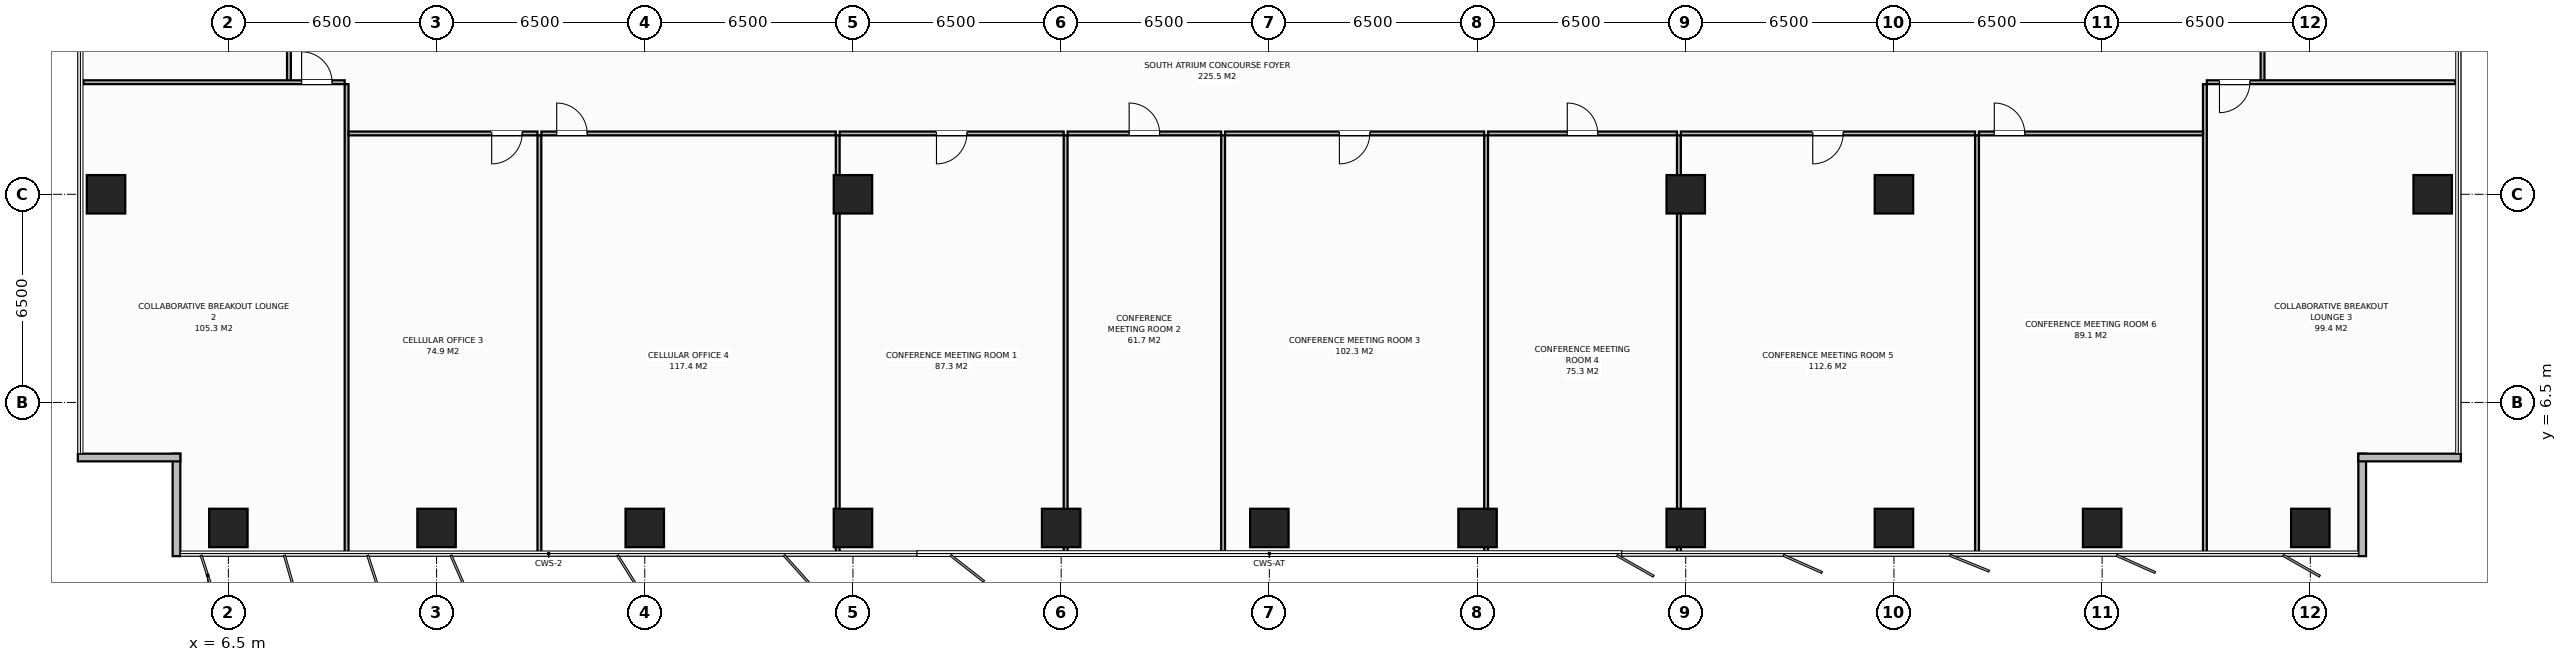
"""IFC4 building model, lengths in metres.
Left out: names, types, materials, properties, quantities, classifications, styles, units other than length and angle.
Written with IfcOpenShell. Run it as: python <this file> out.ifc"""

import sys

from ifc_helpers import new_model, si_unit, direction, frame, frame_2d, origin, origin_2d, place, context, subcontext, project, spatial, rectangle, extrude, element, fill, save


model = new_model("IFC4")
c1 = context("Model", 3, precision=1e-05, world=origin(), true_north=direction((0.0, 1.0)))
c2 = subcontext(c1, "Body", "Model", "MODEL_VIEW")
j1 = project(units=[si_unit("LENGTHUNIT", "METRE"), si_unit("PLANEANGLEUNIT", "RADIAN")], contexts=[c1])
p1 = place(None, origin())
s1 = spatial("IfcSite", under=j1, at=p1, CompositionType="ELEMENT")
p2 = place(p1, origin())
s2 = spatial("IfcBuilding", under=s1, at=p2, CompositionType="ELEMENT")
p3 = place(p2, frame((0.0, 0.0, 135.4)))
s3 = spatial("IfcBuildingStorey", under=s2, at=p3, CompositionType="ELEMENT", Elevation=135.4)
for number, where, z_axis, x_axis in (
    (1, (58.5, 13.0, 0.0), (0.0, 0.0, 1.0), (1.0, 0.0, 0.0)),
    (2, (26.0, 13.0, 0.0), (0.0, 0.0, 1.0), (1.0, 0.0, 0.0)),
    (3, (52.0, 13.0, 0.0), (0.0, 0.0, 1.0), (1.0, 0.0, 0.0)),
    (4, (6.5, 2.58, 0.0), (0.0, 0.0, 1.0), (1.0, 0.0, 0.0)),
    (5, (13.0, 2.58, 0.0), (0.0, 0.0, 1.0), (1.0, 0.0, 0.0)),
    (6, (19.5, 2.58, 0.0), (0.0, 0.0, 1.0), (1.0, 0.0, 0.0)),
    (7, (26.0, 2.58, 0.0), (0.0, 0.0, 1.0), (1.0, 0.0, 0.0)),
    (8, (32.5, 2.58, 0.0), (0.0, 0.0, 1.0), (1.0, 0.0, 0.0)),
    (9, (39.0, 2.58, 0.0), (0.0, 0.0, 1.0), (1.0, 0.0, 0.0)),
    (10, (45.5, 2.58, 0.0), (0.0, 0.0, 1.0), (1.0, 0.0, 0.0)),
    (11, (52.0, 2.58, 0.0), (0.0, 0.0, 1.0), (1.0, 0.0, 0.0)),
    (12, (58.5, 2.58, 0.0), (0.0, 0.0, 1.0), (1.0, 0.0, 0.0)),
    (13, (65.0, 2.58, 0.0), (0.0, 0.0, 1.0), (1.0, 0.0, 0.0)),
    (14, (71.5, 2.58, 0.0), (0.0, 0.0, 1.0), (1.0, 0.0, 0.0)),
    (15, (2.68, 13.0, 0.0), (0.0, 0.0, 1.0), (1.0, 0.0, 0.0)),
    (16, (75.32, 13.0, 0.0), (0.0, 0.0, 1.0), (1.0, 0.0, 0.0)),
):
    element("IfcColumn", number, at=place(p3, frame(where, z_axis=z_axis, x_axis=x_axis)), inside=s3, PredefinedType="COLUMN", context=c2, shape_type="SweptSolid", body=[
        extrude(rectangle(XDim=1.2, YDim=1.2, at=origin_2d()), origin(), (0.0, 0.0, 1.0), 3.8),
    ])
for number, where, z_axis, x_axis in (
    (17, (4.88, 1.7, 0.0), (0.0, 0.0, 1.0), (0.0, 1.0, 0.0)),
    (18, (5.0, 4.78, 0.0), (0.0, 0.0, 1.0), (-1.0, 0.0, 0.0)),
    (19, (73.12, 4.9, 0.0), (0.0, 0.0, 1.0), (0.0, -1.0, 0.0)),
    (20, (76.2, 4.78, 0.0), (0.0, 0.0, 1.0), (-1.0, 0.0, 0.0)),
):
    element("IfcWall", number, at=place(p3, frame(where, z_axis=z_axis, x_axis=x_axis)), inside=s3, PredefinedType="STANDARD", context=c2, shape_type="SweptSolid", body=[
        extrude(rectangle(XDim=3.2, YDim=0.24, at=frame_2d((1.6, 0.0))), origin(), (0.0, 0.0, 1.0), 3.52),
    ])
for number, where, z_axis, x_axis in (
    (21, (8.391, 16.5, 0.0), (0.0, 0.0, 1.0), (0.0, 1.0, 0.0)),
    (22, (70.009, 16.5, 0.0), (0.0, 0.0, 1.0), (0.0, 1.0, 0.0)),
):
    element("IfcWall", number, at=place(p3, frame(where, z_axis=z_axis, x_axis=x_axis)), inside=s3, PredefinedType="PARTITIONING", context=c2, shape_type="SweptSolid", body=[
        extrude(rectangle(XDim=2.1, YDim=0.12, at=frame_2d((1.05, 0.0))), origin(), (0.0, 0.0, 1.0), 3.52),
    ])
p4 = place(p3, frame((10.191, 1.72, 0.0), z_axis=(0.0, 0.0, 1.0), x_axis=(0.0, 1.0, 0.0)))
e23 = element("IfcWall", 23, at=p4, inside=s3, PredefinedType="PARTITIONING", context=c2, shape_type="SweptSolid", body=[
    extrude(rectangle(XDim=14.72, YDim=0.12, at=frame_2d((7.36, 0.0))), origin(), (0.0, 0.0, 1.0), 3.52),
])
p5 = place(p3, frame((1.98, 16.5, 0.0), z_axis=(0.0, 0.0, 1.0), x_axis=(1.0, 0.0, 0.0)))
e24 = element("IfcWall", 24, at=p5, inside=s3, PredefinedType="PARTITIONING", context=c2, shape_type="SweptSolid", body=[
    extrude(rectangle(XDim=8.151, YDim=0.12, at=frame_2d((4.076, 0.0))), origin(), (0.0, 0.0, 1.0), 3.52),
])
p6 = place(p5, frame((6.806, 0.0, 0.0)))
e25 = element("IfcOpeningElement", 25, at=p6, cuts=e24, PredefinedType="OPENING", context=c2, shape_type="SweptSolid", body=[
    extrude(rectangle(XDim=0.95, YDim=2.15, at=frame_2d((0.475, 1.075))), frame((0.0, 0.07, 0.0), z_axis=(0.0, -1.0, 0.0), x_axis=(1.0, 0.0, 0.0)), (0.0, 0.0, 1.0), 0.14),
])
p7 = place(p3, frame((16.21, 1.72, 0.0), z_axis=(0.0, 0.0, 1.0), x_axis=(0.0, 1.0, 0.0)))
e26 = element("IfcWall", 26, at=p7, inside=s3, PredefinedType="PARTITIONING", context=c2, shape_type="SweptSolid", body=[
    extrude(rectangle(XDim=13.12, YDim=0.12, at=frame_2d((6.56, 0.0))), origin(), (0.0, 0.0, 1.0), 3.52),
])
p8 = place(p3, frame((10.251, 14.9, 0.0), z_axis=(0.0, 0.0, 1.0), x_axis=(1.0, 0.0, 0.0)))
e27 = element("IfcWall", 27, at=p8, inside=s3, PredefinedType="PARTITIONING", context=c2, shape_type="SweptSolid", body=[
    extrude(rectangle(XDim=5.899, YDim=0.12, at=frame_2d((2.95, 0.0))), origin(), (0.0, 0.0, 1.0), 3.52),
])
p9 = place(p8, frame((4.469, 0.0, 0.0)))
e28 = element("IfcOpeningElement", 28, at=p9, cuts=e27, PredefinedType="OPENING", context=c2, shape_type="SweptSolid", body=[
    extrude(rectangle(XDim=0.95, YDim=2.15, at=frame_2d((0.475, 1.075))), frame((0.0, 0.07, 0.0), z_axis=(0.0, -1.0, 0.0), x_axis=(1.0, 0.0, 0.0)), (0.0, 0.0, 1.0), 0.14),
])
p10 = place(p3, frame((25.525, 1.72, 0.0), z_axis=(0.0, 0.0, 1.0), x_axis=(0.0, 1.0, 0.0)))
e29 = element("IfcWall", 29, at=p10, inside=s3, PredefinedType="PARTITIONING", context=c2, shape_type="SweptSolid", body=[
    extrude(rectangle(XDim=13.12, YDim=0.12, at=frame_2d((6.56, 0.0))), origin(), (0.0, 0.0, 1.0), 3.52),
])
p11 = place(p3, frame((16.271, 14.9, 0.0), z_axis=(0.0, 0.0, 1.0), x_axis=(1.0, 0.0, 0.0)))
e30 = element("IfcWall", 30, at=p11, inside=s3, PredefinedType="PARTITIONING", context=c2, shape_type="SweptSolid", body=[
    extrude(rectangle(XDim=9.194, YDim=0.12, at=frame_2d((4.597, 0.0))), origin(), (0.0, 0.0, 1.0), 3.52),
])
p12 = place(p11, frame((0.48, 0.0, 0.0)))
e31 = element("IfcOpeningElement", 31, at=p12, cuts=e30, PredefinedType="OPENING", context=c2, shape_type="SweptSolid", body=[
    extrude(rectangle(XDim=0.95, YDim=2.15, at=frame_2d((0.475, 1.075))), frame((0.0, 0.07, 0.0), z_axis=(0.0, -1.0, 0.0), x_axis=(1.0, 0.0, 0.0)), (0.0, 0.0, 1.0), 0.14),
])
p13 = place(p3, frame((32.64, 1.72, 0.0), z_axis=(0.0, 0.0, 1.0), x_axis=(0.0, 1.0, 0.0)))
e32 = element("IfcWall", 32, at=p13, inside=s3, PredefinedType="PARTITIONING", context=c2, shape_type="SweptSolid", body=[
    extrude(rectangle(XDim=13.12, YDim=0.12, at=frame_2d((6.56, 0.0))), origin(), (0.0, 0.0, 1.0), 2.72),
])
p14 = place(p3, frame((25.585, 14.9, 0.0), z_axis=(0.0, 0.0, 1.0), x_axis=(1.0, 0.0, 0.0)))
e33 = element("IfcWall", 33, at=p14, inside=s3, PredefinedType="PARTITIONING", context=c2, shape_type="SweptSolid", body=[
    extrude(rectangle(XDim=6.995, YDim=0.12, at=frame_2d((3.498, 0.0))), origin(), (0.0, 0.0, 1.0), 3.52),
])
p15 = place(p14, frame((3.023, 0.0, 0.0)))
e34 = element("IfcOpeningElement", 34, at=p15, cuts=e33, PredefinedType="OPENING", context=c2, shape_type="SweptSolid", body=[
    extrude(rectangle(XDim=0.95, YDim=2.15, at=frame_2d((0.475, 1.075))), frame((0.0, 0.07, 0.0), z_axis=(0.0, -1.0, 0.0), x_axis=(1.0, 0.0, 0.0)), (0.0, 0.0, 1.0), 0.14),
])
p16 = place(p3, frame((37.556, 1.72, 0.0), z_axis=(0.0, 0.0, 1.0), x_axis=(0.0, 1.0, 0.0)))
e35 = element("IfcWall", 35, at=p16, inside=s3, PredefinedType="PARTITIONING", context=c2, shape_type="SweptSolid", body=[
    extrude(rectangle(XDim=13.12, YDim=0.12, at=frame_2d((6.56, 0.0))), origin(), (0.0, 0.0, 1.0), 3.52),
])
p17 = place(p3, frame((32.7, 14.9, 0.0), z_axis=(0.0, 0.0, 1.0), x_axis=(1.0, 0.0, 0.0)))
e36 = element("IfcWall", 36, at=p17, inside=s3, PredefinedType="PARTITIONING", context=c2, shape_type="SweptSolid", body=[
    extrude(rectangle(XDim=4.796, YDim=0.12, at=frame_2d((2.398, 0.0))), origin(), (0.0, 0.0, 1.0), 3.52),
])
p18 = place(p17, frame((1.923, 0.0, 0.0)))
e37 = element("IfcOpeningElement", 37, at=p18, cuts=e36, PredefinedType="OPENING", context=c2, shape_type="SweptSolid", body=[
    extrude(rectangle(XDim=0.95, YDim=2.15, at=frame_2d((0.475, 1.075))), frame((0.0, 0.07, 0.0), z_axis=(0.0, -1.0, 0.0), x_axis=(1.0, 0.0, 0.0)), (0.0, 0.0, 1.0), 0.14),
])
p19 = place(p3, frame((45.767, 1.72, 0.0), z_axis=(0.0, 0.0, 1.0), x_axis=(0.0, 1.0, 0.0)))
e38 = element("IfcWall", 38, at=p19, inside=s3, PredefinedType="PARTITIONING", context=c2, shape_type="SweptSolid", body=[
    extrude(rectangle(XDim=13.12, YDim=0.12, at=frame_2d((6.56, 0.0))), origin(), (0.0, 0.0, 1.0), 3.52),
])
p20 = place(p3, frame((37.616, 14.9, 0.0), z_axis=(0.0, 0.0, 1.0), x_axis=(1.0, 0.0, 0.0)))
e39 = element("IfcWall", 39, at=p20, inside=s3, PredefinedType="PARTITIONING", context=c2, shape_type="SweptSolid", body=[
    extrude(rectangle(XDim=8.091, YDim=0.12, at=frame_2d((4.045, 0.0))), origin(), (0.0, 0.0, 1.0), 3.52),
])
p21 = place(p20, frame((3.571, 0.0, 0.0)))
e40 = element("IfcOpeningElement", 40, at=p21, cuts=e39, PredefinedType="OPENING", context=c2, shape_type="SweptSolid", body=[
    extrude(rectangle(XDim=0.95, YDim=2.15, at=frame_2d((0.475, 1.075))), frame((0.0, 0.07, 0.0), z_axis=(0.0, -1.0, 0.0), x_axis=(1.0, 0.0, 0.0)), (0.0, 0.0, 1.0), 0.14),
])
p22 = place(p3, frame((51.787, 1.72, 0.0), z_axis=(0.0, 0.0, 1.0), x_axis=(0.0, 1.0, 0.0)))
e41 = element("IfcWall", 41, at=p22, inside=s3, PredefinedType="PARTITIONING", context=c2, shape_type="SweptSolid", body=[
    extrude(rectangle(XDim=13.12, YDim=0.12, at=frame_2d((6.56, 0.0))), origin(), (0.0, 0.0, 1.0), 2.72),
])
p23 = place(p3, frame((45.827, 14.9, 0.0), z_axis=(0.0, 0.0, 1.0), x_axis=(1.0, 0.0, 0.0)))
e42 = element("IfcWall", 42, at=p23, inside=s3, PredefinedType="PARTITIONING", context=c2, shape_type="SweptSolid", body=[
    extrude(rectangle(XDim=5.899, YDim=0.12, at=frame_2d((2.95, 0.0))), origin(), (0.0, 0.0, 1.0), 3.52),
])
p24 = place(p23, frame((2.475, 0.0, 0.0)))
e43 = element("IfcOpeningElement", 43, at=p24, cuts=e42, PredefinedType="OPENING", context=c2, shape_type="SweptSolid", body=[
    extrude(rectangle(XDim=0.95, YDim=2.15, at=frame_2d((0.475, 1.075))), frame((0.0, 0.07, 0.0), z_axis=(0.0, -1.0, 0.0), x_axis=(1.0, 0.0, 0.0)), (0.0, 0.0, 1.0), 0.14),
])
p25 = place(p3, frame((61.094, 1.72, 0.0), z_axis=(0.0, 0.0, 1.0), x_axis=(0.0, 1.0, 0.0)))
e44 = element("IfcWall", 44, at=p25, inside=s3, PredefinedType="PARTITIONING", context=c2, shape_type="SweptSolid", body=[
    extrude(rectangle(XDim=13.12, YDim=0.12, at=frame_2d((6.56, 0.0))), origin(), (0.0, 0.0, 1.0), 3.52),
])
p26 = place(p3, frame((51.847, 14.9, 0.0), z_axis=(0.0, 0.0, 1.0), x_axis=(1.0, 0.0, 0.0)))
e45 = element("IfcWall", 45, at=p26, inside=s3, PredefinedType="PARTITIONING", context=c2, shape_type="SweptSolid", body=[
    extrude(rectangle(XDim=9.187, YDim=0.12, at=frame_2d((4.593, 0.0))), origin(), (0.0, 0.0, 1.0), 3.52),
])
p27 = place(p26, frame((4.118, 0.0, 0.0)))
e46 = element("IfcOpeningElement", 46, at=p27, cuts=e45, PredefinedType="OPENING", context=c2, shape_type="SweptSolid", body=[
    extrude(rectangle(XDim=0.95, YDim=2.15, at=frame_2d((0.475, 1.075))), frame((0.0, 0.07, 0.0), z_axis=(0.0, -1.0, 0.0), x_axis=(1.0, 0.0, 0.0)), (0.0, 0.0, 1.0), 0.14),
])
p28 = place(p3, frame((68.209, 1.72, 0.0), z_axis=(0.0, 0.0, 1.0), x_axis=(0.0, 1.0, 0.0)))
e47 = element("IfcWall", 47, at=p28, inside=s3, PredefinedType="PARTITIONING", context=c2, shape_type="SweptSolid", body=[
    extrude(rectangle(XDim=14.72, YDim=0.12, at=frame_2d((7.36, 0.0))), origin(), (0.0, 0.0, 1.0), 3.52),
])
p29 = place(p3, frame((61.154, 14.9, 0.0), z_axis=(0.0, 0.0, 1.0), x_axis=(1.0, 0.0, 0.0)))
e48 = element("IfcWall", 48, at=p29, inside=s3, PredefinedType="PARTITIONING", context=c2, shape_type="SweptSolid", body=[
    extrude(rectangle(XDim=6.995, YDim=0.12, at=frame_2d((3.498, 0.0))), origin(), (0.0, 0.0, 1.0), 3.52),
])
p30 = place(p29, frame((0.48, 0.0, 0.0)))
e49 = element("IfcOpeningElement", 49, at=p30, cuts=e48, PredefinedType="OPENING", context=c2, shape_type="SweptSolid", body=[
    extrude(rectangle(XDim=0.95, YDim=2.15, at=frame_2d((0.475, 1.075))), frame((0.0, 0.07, 0.0), z_axis=(0.0, -1.0, 0.0), x_axis=(1.0, 0.0, 0.0)), (0.0, 0.0, 1.0), 0.14),
])
p31 = place(p3, frame((68.269, 16.5, 0.0), z_axis=(0.0, 0.0, 1.0), x_axis=(1.0, 0.0, 0.0)))
e50 = element("IfcWall", 50, at=p31, inside=s3, PredefinedType="PARTITIONING", context=c2, shape_type="SweptSolid", body=[
    extrude(rectangle(XDim=7.751, YDim=0.12, at=frame_2d((3.875, 0.0))), origin(), (0.0, 0.0, 1.0), 3.52),
])
p32 = place(p31, frame((0.395, 0.0, 0.0)))
e51 = element("IfcOpeningElement", 51, at=p32, cuts=e50, PredefinedType="OPENING", context=c2, shape_type="SweptSolid", body=[
    extrude(rectangle(XDim=0.95, YDim=2.15, at=frame_2d((0.475, 1.075))), frame((0.0, 0.07, 0.0), z_axis=(0.0, -1.0, 0.0), x_axis=(1.0, 0.0, 0.0)), (0.0, 0.0, 1.0), 0.14),
])
p33 = place(p6, origin())
e52 = element("IfcDoor", 52, at=p33, inside=s3, OperationType="SINGLE_SWING_LEFT", PredefinedType="DOOR", context=c2, shape_type="SweptSolid", body=[
    extrude(rectangle(XDim=0.95, YDim=2.15, at=frame_2d((0.475, 1.075))), frame((0.0, 0.025, 0.0), z_axis=(0.0, -1.0, 0.0), x_axis=(1.0, 0.0, 0.0)), (0.0, 0.0, 1.0), 0.05),
])
fill(e25, e52)
p34 = place(p9, origin())
e53 = element("IfcDoor", 53, at=p34, inside=s3, OperationType="SINGLE_SWING_RIGHT", PredefinedType="DOOR", context=c2, shape_type="SweptSolid", body=[
    extrude(rectangle(XDim=0.95, YDim=2.15, at=frame_2d((0.475, 1.075))), frame((0.0, 0.025, 0.0), z_axis=(0.0, -1.0, 0.0), x_axis=(1.0, 0.0, 0.0)), (0.0, 0.0, 1.0), 0.05),
])
fill(e28, e53)
p35 = place(p12, origin())
e54 = element("IfcDoor", 54, at=p35, inside=s3, OperationType="SINGLE_SWING_LEFT", PredefinedType="DOOR", context=c2, shape_type="SweptSolid", body=[
    extrude(rectangle(XDim=0.95, YDim=2.15, at=frame_2d((0.475, 1.075))), frame((0.0, 0.025, 0.0), z_axis=(0.0, -1.0, 0.0), x_axis=(1.0, 0.0, 0.0)), (0.0, 0.0, 1.0), 0.05),
])
fill(e31, e54)
p36 = place(p15, origin())
e55 = element("IfcDoor", 55, at=p36, inside=s3, OperationType="SINGLE_SWING_RIGHT", PredefinedType="DOOR", context=c2, shape_type="SweptSolid", body=[
    extrude(rectangle(XDim=0.95, YDim=2.15, at=frame_2d((0.475, 1.075))), frame((0.0, 0.025, 0.0), z_axis=(0.0, -1.0, 0.0), x_axis=(1.0, 0.0, 0.0)), (0.0, 0.0, 1.0), 0.05),
])
fill(e34, e55)
p37 = place(p18, origin())
e56 = element("IfcDoor", 56, at=p37, inside=s3, OperationType="SINGLE_SWING_LEFT", PredefinedType="DOOR", context=c2, shape_type="SweptSolid", body=[
    extrude(rectangle(XDim=0.95, YDim=2.15, at=frame_2d((0.475, 1.075))), frame((0.0, 0.025, 0.0), z_axis=(0.0, -1.0, 0.0), x_axis=(1.0, 0.0, 0.0)), (0.0, 0.0, 1.0), 0.05),
])
fill(e37, e56)
p38 = place(p21, origin())
e57 = element("IfcDoor", 57, at=p38, inside=s3, OperationType="SINGLE_SWING_RIGHT", PredefinedType="DOOR", context=c2, shape_type="SweptSolid", body=[
    extrude(rectangle(XDim=0.95, YDim=2.15, at=frame_2d((0.475, 1.075))), frame((0.0, 0.025, 0.0), z_axis=(0.0, -1.0, 0.0), x_axis=(1.0, 0.0, 0.0)), (0.0, 0.0, 1.0), 0.05),
])
fill(e40, e57)
p39 = place(p24, origin())
e58 = element("IfcDoor", 58, at=p39, inside=s3, OperationType="SINGLE_SWING_LEFT", PredefinedType="DOOR", context=c2, shape_type="SweptSolid", body=[
    extrude(rectangle(XDim=0.95, YDim=2.15, at=frame_2d((0.475, 1.075))), frame((0.0, 0.025, 0.0), z_axis=(0.0, -1.0, 0.0), x_axis=(1.0, 0.0, 0.0)), (0.0, 0.0, 1.0), 0.05),
])
fill(e43, e58)
p40 = place(p27, origin())
e59 = element("IfcDoor", 59, at=p40, inside=s3, OperationType="SINGLE_SWING_RIGHT", PredefinedType="DOOR", context=c2, shape_type="SweptSolid", body=[
    extrude(rectangle(XDim=0.95, YDim=2.15, at=frame_2d((0.475, 1.075))), frame((0.0, 0.025, 0.0), z_axis=(0.0, -1.0, 0.0), x_axis=(1.0, 0.0, 0.0)), (0.0, 0.0, 1.0), 0.05),
])
fill(e46, e59)
p41 = place(p30, origin())
e60 = element("IfcDoor", 60, at=p41, inside=s3, OperationType="SINGLE_SWING_LEFT", PredefinedType="DOOR", context=c2, shape_type="SweptSolid", body=[
    extrude(rectangle(XDim=0.95, YDim=2.15, at=frame_2d((0.475, 1.075))), frame((0.0, 0.025, 0.0), z_axis=(0.0, -1.0, 0.0), x_axis=(1.0, 0.0, 0.0)), (0.0, 0.0, 1.0), 0.05),
])
fill(e49, e60)
p42 = place(p32, origin())
e61 = element("IfcDoor", 61, at=p42, inside=s3, OperationType="SINGLE_SWING_RIGHT", PredefinedType="DOOR", context=c2, shape_type="SweptSolid", body=[
    extrude(rectangle(XDim=0.95, YDim=2.15, at=frame_2d((0.475, 1.075))), frame((0.0, 0.025, 0.0), z_axis=(0.0, -1.0, 0.0), x_axis=(1.0, 0.0, 0.0)), (0.0, 0.0, 1.0), 0.05),
])
fill(e51, e61)
save(model, sys.argv[1])
